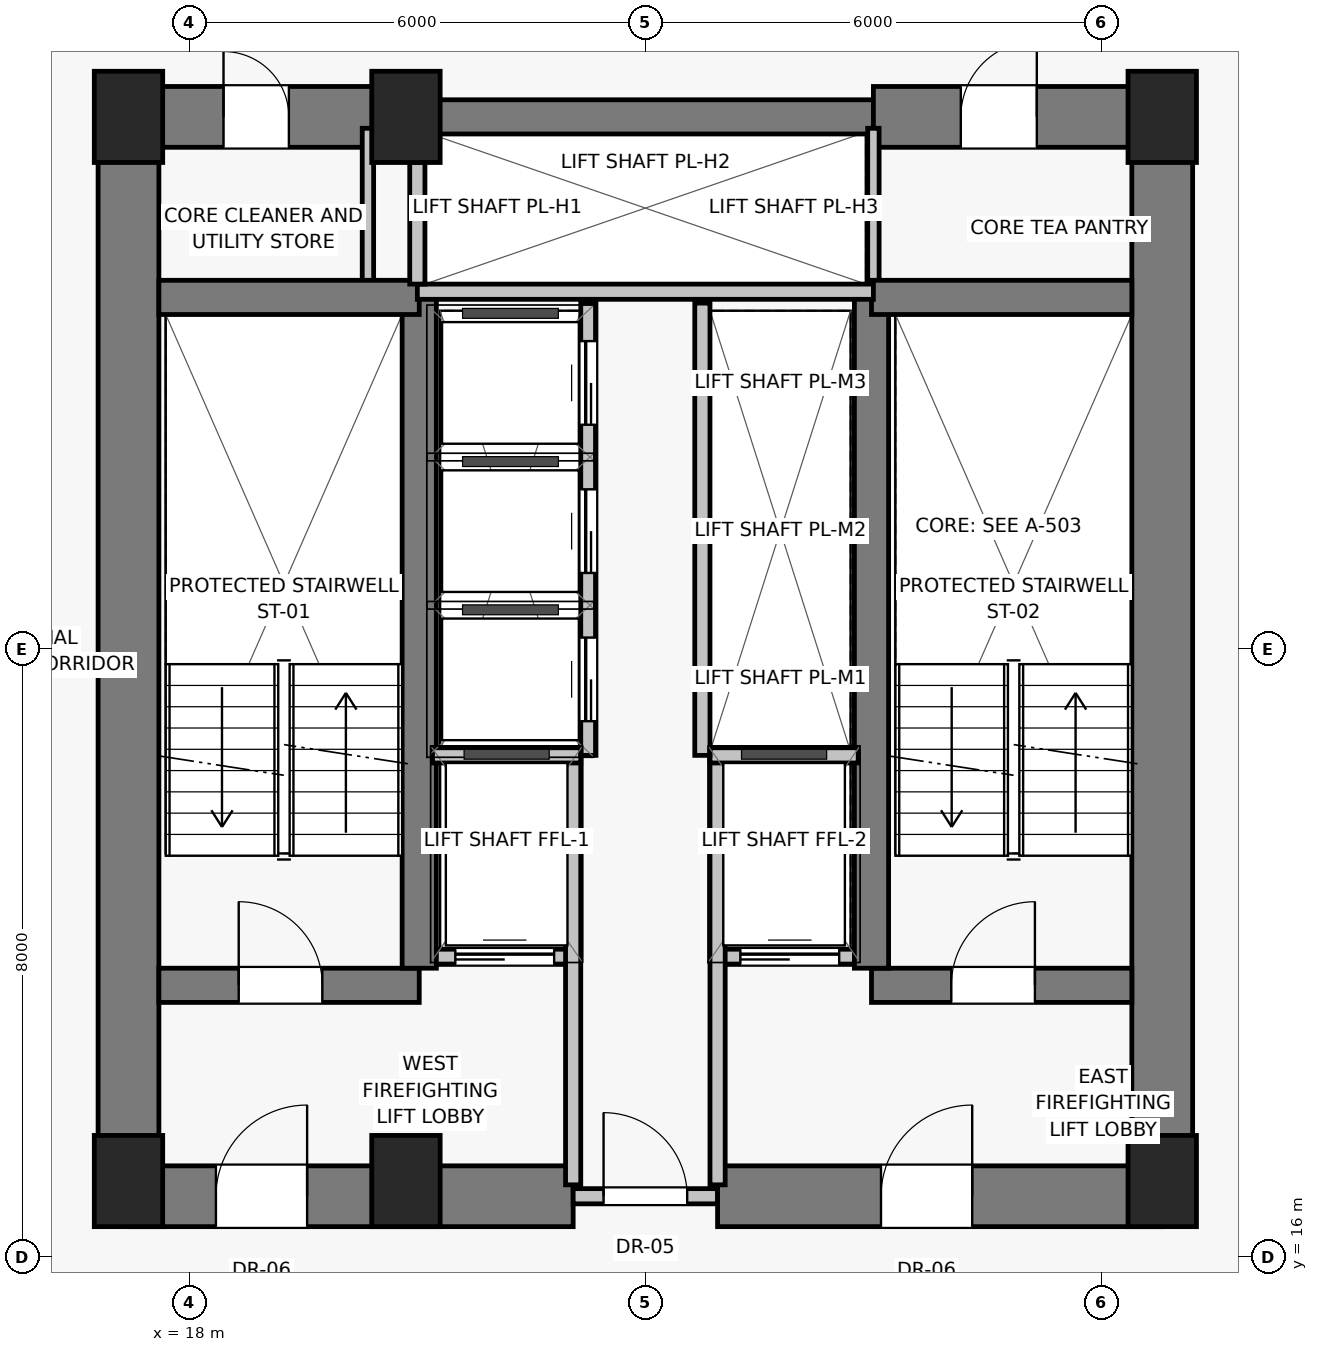
"""IFC4 building model, lengths in metres.
Left out: names, types, materials, properties, quantities, classifications, styles, units other than length and angle.
Written with IfcOpenShell. Run it as: python <this file> out.ifc"""

import sys

from ifc_helpers import new_model, si_unit, direction, frame, frame_2d, origin, origin_2d, place, context, subcontext, project, spatial, rectangle, extrude, source, transform, mapped, element, fill, save


model = new_model("IFC4")
c1 = context("Model", 3, precision=1e-05, world=origin(), true_north=direction((0.0, 1.0)))
c2 = subcontext(c1, "Body", "Model", "MODEL_VIEW")
j1 = project(units=[si_unit("LENGTHUNIT", "METRE"), si_unit("PLANEANGLEUNIT", "RADIAN")], contexts=[c1])
p1 = place(None, origin())
s1 = spatial("IfcSite", under=j1, at=p1, CompositionType="ELEMENT")
p2 = place(p1, origin())
s2 = spatial("IfcBuilding", under=s1, at=p2, CompositionType="ELEMENT")
p3 = place(p2, frame((0.0, 0.0, 30.55)))
s3 = spatial("IfcBuildingStorey", under=s2, at=p3, CompositionType="ELEMENT", Elevation=30.55)
for number, where, z_axis, x_axis in (
    (1, (17.2, 17.0, 0.0), (0.0, 0.0, 1.0), (1.0, 0.0, 0.0)),
    (2, (20.85, 17.0, 0.0), (0.0, 0.0, 1.0), (1.0, 0.0, 0.0)),
    (3, (30.8, 17.0, 0.0), (0.0, 0.0, 1.0), (1.0, 0.0, 0.0)),
    (4, (17.2, 31.0, 0.0), (0.0, 0.0, 1.0), (1.0, 0.0, 0.0)),
    (5, (20.85, 31.0, 0.0), (0.0, 0.0, 1.0), (1.0, 0.0, 0.0)),
    (6, (30.8, 31.0, 0.0), (0.0, 0.0, 1.0), (1.0, 0.0, 0.0)),
):
    element("IfcColumn", number, at=place(p3, frame(where, z_axis=z_axis, x_axis=x_axis)), inside=s3, PredefinedType="PILASTER", context=c2, shape_type="SweptSolid", body=[
        extrude(rectangle(XDim=0.9, YDim=1.2, at=origin_2d()), origin(), (0.0, 0.0, 1.0), 3.25),
    ])
for number, where, z_axis, x_axis in (
    (7, (17.2, 16.8, 0.0), (0.0, 0.0, 1.0), (0.0, 1.0, 0.0)),
    (8, (30.8, 16.8, 0.0), (0.0, 0.0, 1.0), (0.0, 1.0, 0.0)),
):
    element("IfcWall", number, at=place(p3, frame(where, z_axis=z_axis, x_axis=x_axis)), inside=s3, PredefinedType="SHEAR", context=c2, shape_type="SweptSolid", body=[
        extrude(rectangle(XDim=14.2, YDim=0.8, at=frame_2d((7.1, 0.0))), origin(), (0.0, 0.0, 1.0), 3.0),
    ])
p4 = place(p3, frame((17.2, 16.8, 0.0), z_axis=(0.0, 0.0, 1.0), x_axis=(1.0, 0.0, 0.0)))
e9 = element("IfcWall", 9, at=p4, inside=s3, PredefinedType="SHEAR", context=c2, shape_type="SweptSolid", body=[
    extrude(rectangle(XDim=5.85, YDim=0.8, at=frame_2d((2.925, 0.0))), origin(), (0.0, 0.0, 1.0), 3.0),
])
p5 = place(p4, frame((1.15, 0.0, 0.0)))
e10 = element("IfcOpeningElement", 10, at=p5, cuts=e9, PredefinedType="OPENING", context=c2, shape_type="SweptSolid", body=[
    extrude(rectangle(XDim=1.2, YDim=2.03, at=frame_2d((0.6, 1.015))), frame((0.0, 0.41, 0.0), z_axis=(0.0, -1.0, 0.0), x_axis=(1.0, 0.0, 0.0)), (0.0, 0.0, 1.0), 0.82),
])
p6 = place(p3, frame((23.05, 16.8, 0.0), z_axis=(0.0, 0.0, 1.0), x_axis=(1.0, 0.0, 0.0)))
e11 = element("IfcWall", 11, at=p6, inside=s3, PredefinedType="SOLIDWALL", context=c2, shape_type="SweptSolid", body=[
    extrude(rectangle(XDim=1.9, YDim=0.2, at=frame_2d((0.95, 0.0))), origin(), (0.0, 0.0, 1.0), 2.15),
])
p7 = place(p6, frame((0.4, 0.0, 0.0)))
e12 = element("IfcOpeningElement", 12, at=p7, cuts=e11, PredefinedType="OPENING", context=c2, shape_type="SweptSolid", body=[
    extrude(rectangle(XDim=1.1, YDim=2.03, at=frame_2d((0.55, 1.015))), frame((0.0, 0.11, 0.0), z_axis=(0.0, -1.0, 0.0), x_axis=(1.0, 0.0, 0.0)), (0.0, 0.0, 1.0), 0.22),
])
p8 = place(p3, frame((24.95, 16.8, 0.0), z_axis=(0.0, 0.0, 1.0), x_axis=(1.0, 0.0, 0.0)))
e13 = element("IfcWall", 13, at=p8, inside=s3, PredefinedType="SHEAR", context=c2, shape_type="SweptSolid", body=[
    extrude(rectangle(XDim=5.85, YDim=0.8, at=frame_2d((2.925, 0.0))), origin(), (0.0, 0.0, 1.0), 3.0),
])
p9 = place(p8, frame((2.15, 0.0, 0.0)))
e14 = element("IfcOpeningElement", 14, at=p9, cuts=e13, PredefinedType="OPENING", context=c2, shape_type="SweptSolid", body=[
    extrude(rectangle(XDim=1.2, YDim=2.03, at=frame_2d((0.6, 1.015))), frame((0.0, 0.41, 0.0), z_axis=(0.0, -1.0, 0.0), x_axis=(1.0, 0.0, 0.0)), (0.0, 0.0, 1.0), 0.82),
])
p10 = place(p3, frame((17.2, 31.0, 0.0), z_axis=(0.0, 0.0, 1.0), x_axis=(1.0, 0.0, 0.0)))
e15 = element("IfcWall", 15, at=p10, inside=s3, PredefinedType="SHEAR", context=c2, shape_type="SweptSolid", body=[
    extrude(rectangle(XDim=3.8, YDim=0.8, at=frame_2d((1.9, 0.0))), origin(), (0.0, 0.0, 1.0), 3.0),
])
p11 = place(p10, frame((1.25, 0.0, 0.0)))
e16 = element("IfcOpeningElement", 16, at=p11, cuts=e15, PredefinedType="OPENING", context=c2, shape_type="SweptSolid", body=[
    extrude(rectangle(XDim=0.86, YDim=2.01, at=frame_2d((0.43, 1.005))), frame((0.0, 0.41, 0.0), z_axis=(0.0, -1.0, 0.0), x_axis=(1.0, 0.0, 0.0)), (0.0, 0.0, 1.0), 0.82),
])
p12 = place(p3, frame((21.0, 31.0, 0.0), z_axis=(0.0, 0.0, 1.0), x_axis=(1.0, 0.0, 0.0)))
e17 = element("IfcWall", 17, at=p12, inside=s3, PredefinedType="SHEAR", context=c2, shape_type="SweptSolid", body=[
    extrude(rectangle(XDim=6.0, YDim=0.45, at=frame_2d((3.0, 0.0))), origin(), (0.0, 0.0, 1.0), 3.0),
])
p13 = place(p3, frame((27.0, 31.0, 0.0), z_axis=(0.0, 0.0, 1.0), x_axis=(1.0, 0.0, 0.0)))
e18 = element("IfcWall", 18, at=p13, inside=s3, PredefinedType="SHEAR", context=c2, shape_type="SweptSolid", body=[
    extrude(rectangle(XDim=3.8, YDim=0.8, at=frame_2d((1.9, 0.0))), origin(), (0.0, 0.0, 1.0), 3.0),
])
p14 = place(p13, frame((1.15, 0.0, 0.0)))
e19 = element("IfcOpeningElement", 19, at=p14, cuts=e18, PredefinedType="OPENING", context=c2, shape_type="SweptSolid", body=[
    extrude(rectangle(XDim=1.0, YDim=2.01, at=frame_2d((0.5, 1.005))), frame((0.0, 0.41, 0.0), z_axis=(0.0, -1.0, 0.0), x_axis=(1.0, 0.0, 0.0)), (0.0, 0.0, 1.0), 0.82),
])
for number, where, z_axis, x_axis in (
    (20, (20.35, 28.65, 0.0), (0.0, 0.0, 1.0), (0.0, 1.0, 0.0)),
    (21, (27.0, 28.65, 0.0), (0.0, 0.0, 1.0), (0.0, 1.0, 0.0)),
):
    element("IfcWall", number, at=place(p3, frame(where, z_axis=z_axis, x_axis=x_axis)), inside=s3, PredefinedType="PARTITIONING", context=c2, shape_type="SweptSolid", body=[
        extrude(rectangle(XDim=2.2, YDim=0.15, at=frame_2d((1.1, 0.0))), origin(), (0.0, 0.0, 1.0), 3.0),
    ])
p15 = place(p3, frame((17.6, 19.575, 0.0), z_axis=(0.0, 0.0, 1.0), x_axis=(1.0, 0.0, 0.0)))
e22 = element("IfcWall", 22, at=p15, inside=s3, PredefinedType="SHEAR", context=c2, shape_type="SweptSolid", body=[
    extrude(rectangle(XDim=3.425, YDim=0.45, at=frame_2d((1.712, 0.0))), origin(), (0.0, 0.0, 1.0), 3.0),
])
p16 = place(p15, frame((1.05, 0.0, 0.0)))
e23 = element("IfcOpeningElement", 23, at=p16, cuts=e22, PredefinedType="OPENING", context=c2, shape_type="SweptSolid", body=[
    extrude(rectangle(XDim=1.1, YDim=2.03, at=frame_2d((0.55, 1.015))), frame((0.0, 0.235, 0.0), z_axis=(0.0, -1.0, 0.0), x_axis=(1.0, 0.0, 0.0)), (0.0, 0.0, 1.0), 0.47),
])
p17 = place(p3, frame((21.2, 19.95, 0.0), z_axis=(0.0, 0.0, 1.0), x_axis=(1.0, 0.0, 0.0)))
e24 = element("IfcWall", 24, at=p17, inside=s3, PredefinedType="SOLIDWALL", context=c2, shape_type="SweptSolid", body=[
    extrude(rectangle(XDim=1.85, YDim=0.2, at=frame_2d((0.925, 0.0))), origin(), (0.0, 0.0, 1.0), 3.0),
])
p18 = place(p17, frame((0.3, 0.0, 0.0)))
e25 = element("IfcOpeningElement", 25, at=p18, cuts=e24, PredefinedType="OPENING", context=c2, shape_type="SweptSolid", body=[
    extrude(rectangle(XDim=1.3, YDim=2.25, at=frame_2d((0.65, 1.125))), frame((0.0, 0.11, 0.0), z_axis=(0.0, -1.0, 0.0), x_axis=(1.0, 0.0, 0.0)), (0.0, 0.0, 1.0), 0.22),
])
p19 = place(p3, frame((24.95, 19.95, 0.0), z_axis=(0.0, 0.0, 1.0), x_axis=(1.0, 0.0, 0.0)))
e26 = element("IfcWall", 26, at=p19, inside=s3, PredefinedType="SOLIDWALL", context=c2, shape_type="SweptSolid", body=[
    extrude(rectangle(XDim=1.85, YDim=0.2, at=frame_2d((0.925, 0.0))), origin(), (0.0, 0.0, 1.0), 3.0),
])
p20 = place(p19, frame((0.3, 0.0, 0.0)))
e27 = element("IfcOpeningElement", 27, at=p20, cuts=e26, PredefinedType="OPENING", context=c2, shape_type="SweptSolid", body=[
    extrude(rectangle(XDim=1.3, YDim=2.25, at=frame_2d((0.65, 1.125))), frame((0.0, 0.11, 0.0), z_axis=(0.0, -1.0, 0.0), x_axis=(1.0, 0.0, 0.0)), (0.0, 0.0, 1.0), 0.22),
])
p21 = place(p3, frame((26.975, 19.575, 0.0), z_axis=(0.0, 0.0, 1.0), x_axis=(1.0, 0.0, 0.0)))
e28 = element("IfcWall", 28, at=p21, inside=s3, PredefinedType="SHEAR", context=c2, shape_type="SweptSolid", body=[
    extrude(rectangle(XDim=3.425, YDim=0.45, at=frame_2d((1.712, 0.0))), origin(), (0.0, 0.0, 1.0), 3.0),
])
p22 = place(p21, frame((1.05, 0.0, 0.0)))
e29 = element("IfcOpeningElement", 29, at=p22, cuts=e28, PredefinedType="OPENING", context=c2, shape_type="SweptSolid", body=[
    extrude(rectangle(XDim=1.1, YDim=2.03, at=frame_2d((0.55, 1.015))), frame((0.0, 0.235, 0.0), z_axis=(0.0, -1.0, 0.0), x_axis=(1.0, 0.0, 0.0)), (0.0, 0.0, 1.0), 0.47),
])
for number, where, z_axis, x_axis in (
    (30, (21.025, 19.8, 0.0), (0.0, 0.0, 1.0), (0.0, 1.0, 0.0)),
    (31, (26.975, 19.8, 0.0), (0.0, 0.0, 1.0), (0.0, 1.0, 0.0)),
):
    element("IfcWall", number, at=place(p3, frame(where, z_axis=z_axis, x_axis=x_axis)), inside=s3, PredefinedType="SHEAR", context=c2, shape_type="SweptSolid", body=[
        extrude(rectangle(XDim=8.825, YDim=0.45, at=frame_2d((4.413, 0.0))), origin(), (0.0, 0.0, 1.0), 3.0),
    ])
for number, where, z_axis, x_axis in (
    (32, (17.6, 28.625, 0.0), (0.0, 0.0, 1.0), (1.0, 0.0, 0.0)),
    (33, (26.975, 28.625, 0.0), (0.0, 0.0, 1.0), (1.0, 0.0, 0.0)),
):
    element("IfcWall", number, at=place(p3, frame(where, z_axis=z_axis, x_axis=x_axis)), inside=s3, PredefinedType="SHEAR", context=c2, shape_type="SweptSolid", body=[
        extrude(rectangle(XDim=3.425, YDim=0.45, at=frame_2d((1.712, 0.0))), origin(), (0.0, 0.0, 1.0), 3.0),
    ])
for number, where, z_axis, x_axis in (
    (34, (23.05, 16.95, 0.0), (0.0, 0.0, 1.0), (0.0, 1.0, 0.0)),
    (35, (24.95, 16.95, 0.0), (0.0, 0.0, 1.0), (0.0, 1.0, 0.0)),
):
    element("IfcWall", number, at=place(p3, frame(where, z_axis=z_axis, x_axis=x_axis)), inside=s3, PredefinedType="SOLIDWALL", context=c2, shape_type="SweptSolid", body=[
        extrude(rectangle(XDim=5.6, YDim=0.2, at=frame_2d((2.8, 0.0))), origin(), (0.0, 0.0, 1.0), 3.0),
    ])
for number, where, z_axis, x_axis in (
    (36, (21.2, 22.6, 0.0), (0.0, 0.0, 1.0), (1.0, 0.0, 0.0)),
    (37, (24.85, 22.6, 0.0), (0.0, 0.0, 1.0), (1.0, 0.0, 0.0)),
):
    element("IfcWall", number, at=place(p3, frame(where, z_axis=z_axis, x_axis=x_axis)), inside=s3, PredefinedType="SOLIDWALL", context=c2, shape_type="SweptSolid", body=[
        extrude(rectangle(XDim=1.95, YDim=0.2, at=frame_2d((0.975, 0.0))), origin(), (0.0, 0.0, 1.0), 3.0),
    ])
p23 = place(p3, frame((21.0, 28.7, 0.0), z_axis=(0.0, 0.0, 1.0), x_axis=(1.0, 0.0, 0.0)))
e38 = element("IfcWall", 38, at=p23, inside=s3, PredefinedType="SOLIDWALL", context=c2, shape_type="SweptSolid", body=[
    extrude(rectangle(XDim=6.0, YDim=0.2, at=frame_2d((3.0, 0.0))), origin(), (0.0, 0.0, 1.0), 3.0),
])
p24 = place(p3, frame((21.0, 28.8, 0.0), z_axis=(0.0, 0.0, 1.0), x_axis=(0.0, 1.0, 0.0)))
e39 = element("IfcWall", 39, at=p24, inside=s3, PredefinedType="SOLIDWALL", context=c2, shape_type="SweptSolid", body=[
    extrude(rectangle(XDim=1.6, YDim=0.2, at=frame_2d((0.8, 0.0))), origin(), (0.0, 0.0, 1.0), 3.0),
])
p25 = place(p3, frame((23.25, 22.6, 0.0), z_axis=(0.0, 0.0, 1.0), x_axis=(0.0, 1.0, 0.0)))
e40 = element("IfcWall", 40, at=p25, inside=s3, PredefinedType="SOLIDWALL", context=c2, shape_type="SweptSolid", body=[
    extrude(rectangle(XDim=5.95, YDim=0.2, at=frame_2d((2.975, 0.0))), origin(), (0.0, 0.0, 1.0), 3.0),
])
p26 = place(p25, frame((0.45, 0.0, 0.0)))
e41 = element("IfcOpeningElement", 41, at=p26, cuts=e40, PredefinedType="OPENING", context=c2, shape_type="SweptSolid", body=[
    extrude(rectangle(XDim=1.1, YDim=2.08, at=frame_2d((0.55, 1.04))), frame((0.0, 0.11, 0.0), z_axis=(0.0, -1.0, 0.0), x_axis=(1.0, 0.0, 0.0)), (0.0, 0.0, 1.0), 0.22),
])
p27 = place(p25, frame((2.4, 0.0, 0.0)))
e42 = element("IfcOpeningElement", 42, at=p27, cuts=e40, PredefinedType="OPENING", context=c2, shape_type="SweptSolid", body=[
    extrude(rectangle(XDim=1.1, YDim=2.08, at=frame_2d((0.55, 1.04))), frame((0.0, 0.11, 0.0), z_axis=(0.0, -1.0, 0.0), x_axis=(1.0, 0.0, 0.0)), (0.0, 0.0, 1.0), 0.22),
])
p28 = place(p25, frame((4.35, 0.0, 0.0)))
e43 = element("IfcOpeningElement", 43, at=p28, cuts=e40, PredefinedType="OPENING", context=c2, shape_type="SweptSolid", body=[
    extrude(rectangle(XDim=1.1, YDim=2.08, at=frame_2d((0.55, 1.04))), frame((0.0, 0.11, 0.0), z_axis=(0.0, -1.0, 0.0), x_axis=(1.0, 0.0, 0.0)), (0.0, 0.0, 1.0), 0.22),
])
p29 = place(p3, frame((24.75, 22.6, 0.0), z_axis=(0.0, 0.0, 1.0), x_axis=(0.0, 1.0, 0.0)))
e44 = element("IfcWall", 44, at=p29, inside=s3, PredefinedType="SOLIDWALL", context=c2, shape_type="SweptSolid", body=[
    extrude(rectangle(XDim=5.95, YDim=0.2, at=frame_2d((2.975, 0.0))), origin(), (0.0, 0.0, 1.0), 3.0),
])
m1 = source(origin(), c2, "Body", "SweptSolid", [
    extrude(rectangle(XDim=1.2, YDim=2.03, at=frame_2d((0.6, 1.015))), frame((0.0, 0.025, 0.0), z_axis=(0.0, -1.0, 0.0), x_axis=(1.0, 0.0, 0.0)), (0.0, 0.0, 1.0), 0.05),
])
p30 = place(p5, origin())
e45 = element("IfcDoor", 45, at=p30, inside=s3, OperationType="SINGLE_SWING_RIGHT", PredefinedType="DOOR", context=c2, shape_type="MappedRepresentation", body=[
    mapped(m1, transform((0.0, 0.0, 0.0), scale=1.0)),
])
fill(e10, e45)
m2 = source(origin(), c2, "Body", "SweptSolid", [
    extrude(rectangle(XDim=1.1, YDim=2.03, at=frame_2d((0.55, 1.015))), frame((0.0, 0.025, 0.0), z_axis=(0.0, -1.0, 0.0), x_axis=(1.0, 0.0, 0.0)), (0.0, 0.0, 1.0), 0.05),
])
p31 = place(p7, origin())
e46 = element("IfcDoor", 46, at=p31, inside=s3, OperationType="SINGLE_SWING_LEFT", PredefinedType="DOOR", context=c2, shape_type="MappedRepresentation", body=[
    mapped(m2, transform((0.0, 0.0, 0.0), scale=1.0)),
])
fill(e12, e46)
p32 = place(p9, origin())
e47 = element("IfcDoor", 47, at=p32, inside=s3, OperationType="SINGLE_SWING_RIGHT", PredefinedType="DOOR", context=c2, shape_type="MappedRepresentation", body=[
    mapped(m1, transform((0.0, 0.0, 0.0), scale=1.0)),
])
fill(e14, e47)
m3 = source(origin(), c2, "Body", "SweptSolid", [
    extrude(rectangle(XDim=0.86, YDim=2.01, at=frame_2d((0.43, 1.005))), frame((0.0, 0.025, 0.0), z_axis=(0.0, -1.0, 0.0), x_axis=(1.0, 0.0, 0.0)), (0.0, 0.0, 1.0), 0.05),
])
p33 = place(p11, origin())
e48 = element("IfcDoor", 48, at=p33, inside=s3, OperationType="SINGLE_SWING_LEFT", PredefinedType="DOOR", context=c2, shape_type="MappedRepresentation", body=[
    mapped(m3, transform((0.0, 0.0, 0.0), scale=1.0)),
])
fill(e16, e48)
m4 = source(origin(), c2, "Body", "SweptSolid", [
    extrude(rectangle(XDim=1.0, YDim=2.01, at=frame_2d((0.5, 1.005))), frame((0.0, 0.025, 0.0), z_axis=(0.0, -1.0, 0.0), x_axis=(1.0, 0.0, 0.0)), (0.0, 0.0, 1.0), 0.05),
])
p34 = place(p14, origin())
e49 = element("IfcDoor", 49, at=p34, inside=s3, OperationType="SINGLE_SWING_RIGHT", PredefinedType="DOOR", context=c2, shape_type="MappedRepresentation", body=[
    mapped(m4, transform((0.0, 0.0, 0.0), scale=1.0)),
])
fill(e19, e49)
p35 = place(p16, origin())
e50 = element("IfcDoor", 50, at=p35, inside=s3, OperationType="SINGLE_SWING_LEFT", PredefinedType="DOOR", context=c2, shape_type="MappedRepresentation", body=[
    mapped(m2, transform((0.0, 0.0, 0.0), scale=1.0)),
])
fill(e23, e50)
m5 = source(origin(), c2, "Body", "SweptSolid", [
    extrude(rectangle(XDim=1.3, YDim=2.25, at=frame_2d((0.65, 1.125))), frame((0.0, 0.025, 0.0), z_axis=(0.0, -1.0, 0.0), x_axis=(1.0, 0.0, 0.0)), (0.0, 0.0, 1.0), 0.05),
])
p36 = place(p18, origin())
e51 = element("IfcDoor", 51, at=p36, inside=s3, OperationType="SLIDING_TO_LEFT", PredefinedType="DOOR", context=c2, shape_type="MappedRepresentation", body=[
    mapped(m5, transform((0.0, 0.0, 0.0), scale=1.0)),
])
fill(e25, e51)
p37 = place(p20, origin())
e52 = element("IfcDoor", 52, at=p37, inside=s3, OperationType="SLIDING_TO_LEFT", PredefinedType="DOOR", context=c2, shape_type="MappedRepresentation", body=[
    mapped(m5, transform((0.0, 0.0, 0.0), scale=1.0)),
])
fill(e27, e52)
p38 = place(p22, origin())
e53 = element("IfcDoor", 53, at=p38, inside=s3, OperationType="SINGLE_SWING_RIGHT", PredefinedType="DOOR", context=c2, shape_type="MappedRepresentation", body=[
    mapped(m2, transform((0.0, 0.0, 0.0), scale=1.0)),
])
fill(e29, e53)
m6 = source(origin(), c2, "Body", "SweptSolid", [
    extrude(rectangle(XDim=1.1, YDim=2.08, at=frame_2d((0.55, 1.04))), frame((0.0, 0.025, 0.0), z_axis=(0.0, -1.0, 0.0), x_axis=(1.0, 0.0, 0.0)), (0.0, 0.0, 1.0), 0.05),
])
p39 = place(p26, origin())
e54 = element("IfcDoor", 54, at=p39, inside=s3, OperationType="SLIDING_TO_LEFT", PredefinedType="DOOR", context=c2, shape_type="MappedRepresentation", body=[
    mapped(m6, transform((0.0, 0.0, 0.0), scale=1.0)),
])
fill(e41, e54)
p40 = place(p27, origin())
e55 = element("IfcDoor", 55, at=p40, inside=s3, OperationType="SLIDING_TO_LEFT", PredefinedType="DOOR", context=c2, shape_type="MappedRepresentation", body=[
    mapped(m6, transform((0.0, 0.0, 0.0), scale=1.0)),
])
fill(e42, e55)
p41 = place(p28, origin())
e56 = element("IfcDoor", 56, at=p41, inside=s3, OperationType="SLIDING_TO_LEFT", PredefinedType="DOOR", context=c2, shape_type="MappedRepresentation", body=[
    mapped(m6, transform((0.0, 0.0, 0.0), scale=1.0)),
])
fill(e43, e56)
save(model, sys.argv[1])
